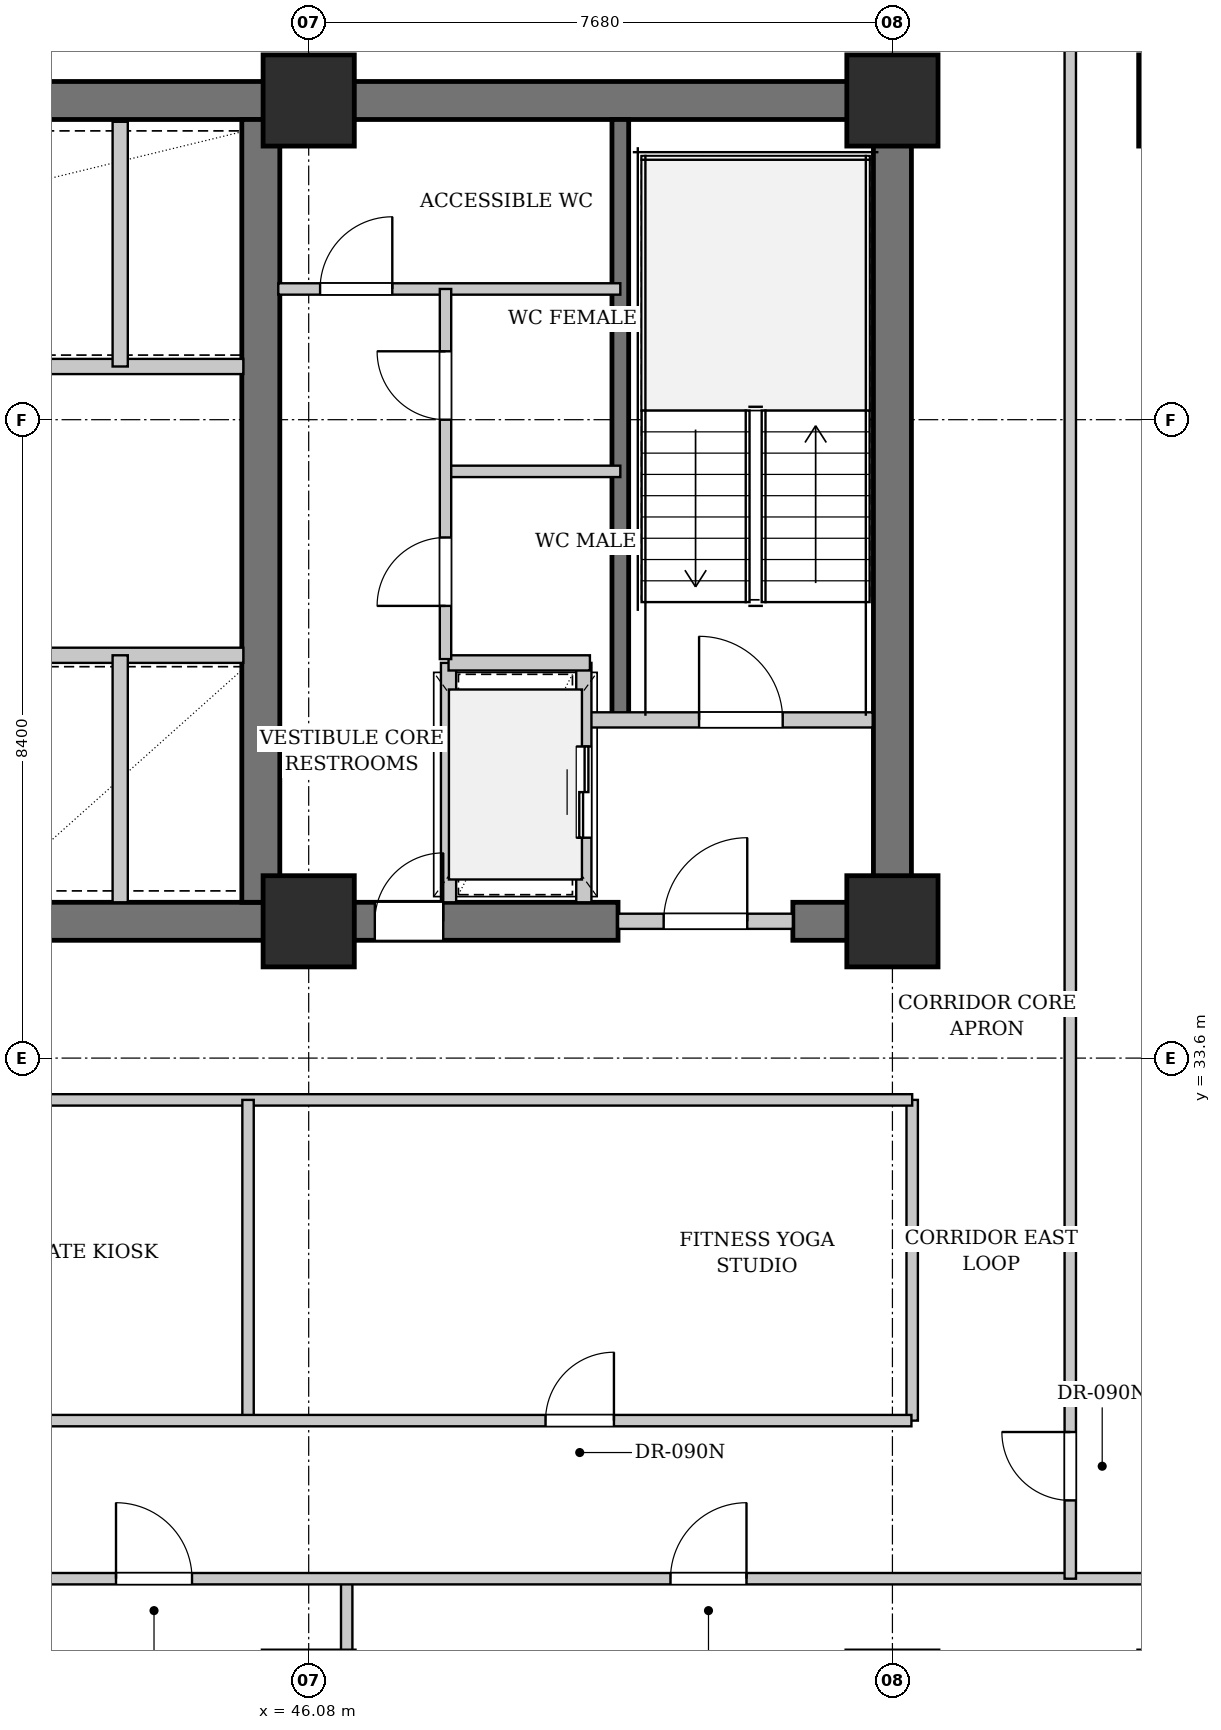
"""IFC4 building model, lengths in metres.
Left out: names, types, materials, properties, quantities, classifications, styles, units other than length and angle.
Written with IfcOpenShell. Run it as: python <this file> out.ifc"""

import sys

from ifc_helpers import new_model, si_unit, direction, frame, frame_2d, origin, origin_2d, place, context, subcontext, project, spatial, rectangle, extrude, element, fill, save


model = new_model("IFC4")
c1 = context("Model", 3, precision=1e-05, world=origin(), true_north=direction((0.0, 1.0)))
c2 = subcontext(c1, "Body", "Model", "MODEL_VIEW")
j1 = project(units=[si_unit("LENGTHUNIT", "METRE"), si_unit("PLANEANGLEUNIT", "RADIAN")], contexts=[c1])
p1 = place(None, origin())
s1 = spatial("IfcSite", under=j1, at=p1, CompositionType="ELEMENT")
p2 = place(p1, origin())
s2 = spatial("IfcBuilding", under=s1, at=p2, CompositionType="ELEMENT")
p3 = place(p2, frame((0.0, 0.0, 54.2)))
s3 = spatial("IfcBuildingStorey", under=s2, at=p3, CompositionType="ELEMENT", Elevation=54.2)
p4 = place(p3, frame((22.79, 46.2, 0.0), z_axis=(0.0, 0.0, 1.0), x_axis=(1.0, 0.0, 0.0)))
e1 = element("IfcWall", 1, at=p4, inside=s3, PredefinedType="SHEAR", context=c2, shape_type="SweptSolid", body=[
    extrude(rectangle(XDim=31.22, YDim=0.5, at=frame_2d((15.61, 0.0))), origin(), (0.0, 0.0, 1.0), 3.18),
])
p5 = place(p3, frame((42.1, 35.4, 0.0), z_axis=(0.0, 0.0, 1.0), x_axis=(1.0, 0.0, 0.0)))
e2 = element("IfcWall", 2, at=p5, inside=s3, PredefinedType="SHEAR", context=c2, shape_type="SweptSolid", body=[
    extrude(rectangle(XDim=8.05, YDim=0.5, at=frame_2d((4.025, 0.0))), origin(), (0.0, 0.0, 1.0), 3.18),
])
p6 = place(p5, frame((4.85, 0.0, 0.0)))
e3 = element("IfcOpeningElement", 3, at=p6, cuts=e2, PredefinedType="OPENING", context=c2, shape_type="SweptSolid", body=[
    extrude(rectangle(XDim=0.9, YDim=2.15, at=frame_2d((0.45, 1.075))), frame((0.0, 0.26, 0.0), z_axis=(0.0, -1.0, 0.0), x_axis=(1.0, 0.0, 0.0)), (0.0, 0.0, 1.0), 0.52),
])
p7 = place(p3, frame((52.45, 35.4, 0.0), z_axis=(0.0, 0.0, 1.0), x_axis=(1.0, 0.0, 0.0)))
e4 = element("IfcWall", 4, at=p7, inside=s3, PredefinedType="SHEAR", context=c2, shape_type="SweptSolid", body=[
    extrude(rectangle(XDim=1.56, YDim=0.5, at=frame_2d((0.78, 0.0))), origin(), (0.0, 0.0, 1.0), 3.18),
])
for number, where, z_axis, x_axis in (
    (5, (45.45, 35.65, 0.0), (0.0, 0.0, 1.0), (0.0, 1.0, 0.0)),
    (6, (53.76, 35.65, 0.0), (0.0, 0.0, 1.0), (0.0, 1.0, 0.0)),
):
    element("IfcWall", number, at=place(p3, frame(where, z_axis=z_axis, x_axis=x_axis)), inside=s3, PredefinedType="SHEAR", context=c2, shape_type="SweptSolid", body=[
        extrude(rectangle(XDim=10.3, YDim=0.5, at=frame_2d((5.15, 0.0))), origin(), (0.0, 0.0, 1.0), 3.18),
    ])
p8 = place(p3, frame((50.18, 38.05, 0.0), z_axis=(0.0, 0.0, 1.0), x_axis=(0.0, 1.0, 0.0)))
e7 = element("IfcWall", 7, at=p8, inside=s3, PredefinedType="SHEAR", context=c2, shape_type="SweptSolid", body=[
    extrude(rectangle(XDim=7.9, YDim=0.22, at=frame_2d((3.95, 0.0))), origin(), (0.0, 0.0, 1.0), 3.18),
])
for number, where, z_axis, x_axis in (
    (8, (46.08, 35.4, 0.0), (0.0, 0.0, 1.0), (1.0, 0.0, 0.0)),
    (9, (46.08, 46.2, 0.0), (0.0, 0.0, 1.0), (1.0, 0.0, 0.0)),
    (10, (53.76, 35.4, 0.0), (0.0, 0.0, 1.0), (1.0, 0.0, 0.0)),
    (11, (53.76, 46.2, 0.0), (0.0, 0.0, 1.0), (1.0, 0.0, 0.0)),
    (12, (57.6, 46.2, 0.0), (0.0, 0.0, 1.0), (1.0, 0.0, 0.0)),
):
    element("IfcColumn", number, at=place(p3, frame(where, z_axis=z_axis, x_axis=x_axis)), inside=s3, PredefinedType="COLUMN", context=c2, shape_type="SweptSolid", body=[
        extrude(rectangle(XDim=1.2, YDim=1.2, at=origin_2d()), origin(), (0.0, 0.0, 1.0), 3.4),
    ])
for number, where, z_axis, x_axis in (
    (13, (41.85, 38.9, 0.0), (0.0, 0.0, 1.0), (1.0, 0.0, 0.0)),
    (14, (41.85, 42.7, 0.0), (0.0, 0.0, 1.0), (1.0, 0.0, 0.0)),
):
    element("IfcWall", number, at=place(p3, frame(where, z_axis=z_axis, x_axis=x_axis)), inside=s3, PredefinedType="PARTITIONING", context=c2, shape_type="SweptSolid", body=[
        extrude(rectangle(XDim=3.37, YDim=0.2, at=frame_2d((1.685, 0.0))), origin(), (0.0, 0.0, 1.0), 3.18),
    ])
p9 = place(p3, frame((43.6, 35.65, 0.0), z_axis=(0.0, 0.0, 1.0), x_axis=(0.0, 1.0, 0.0)))
e15 = element("IfcWall", 15, at=p9, inside=s3, PredefinedType="PARTITIONING", context=c2, shape_type="SweptSolid", body=[
    extrude(rectangle(XDim=3.25, YDim=0.2, at=frame_2d((1.625, 0.0))), origin(), (0.0, 0.0, 1.0), 3.18),
])
p10 = place(p3, frame((43.6, 42.7, 0.0), z_axis=(0.0, 0.0, 1.0), x_axis=(0.0, 1.0, 0.0)))
e16 = element("IfcWall", 16, at=p10, inside=s3, PredefinedType="PARTITIONING", context=c2, shape_type="SweptSolid", body=[
    extrude(rectangle(XDim=3.22, YDim=0.2, at=frame_2d((1.61, 0.0))), origin(), (0.0, 0.0, 1.0), 3.18),
])
p11 = place(p3, frame((49.78, 38.05, 0.0), z_axis=(0.0, 0.0, 1.0), x_axis=(1.0, 0.0, 0.0)))
e17 = element("IfcWall", 17, at=p11, inside=s3, PredefinedType="PARTITIONING", context=c2, shape_type="SweptSolid", body=[
    extrude(rectangle(XDim=3.72, YDim=0.2, at=frame_2d((1.86, 0.0))), origin(), (0.0, 0.0, 1.0), 3.18),
])
p12 = place(p11, frame((1.436, 0.0, 0.0)))
e18 = element("IfcOpeningElement", 18, at=p12, cuts=e17, PredefinedType="OPENING", context=c2, shape_type="SweptSolid", body=[
    extrude(rectangle(XDim=1.1, YDim=2.15, at=frame_2d((0.55, 1.075))), frame((0.0, 0.11, 0.0), z_axis=(0.0, -1.0, 0.0), x_axis=(1.0, 0.0, 0.0)), (0.0, 0.0, 1.0), 0.22),
])
p13 = place(p3, frame((50.15, 35.4, 0.0), z_axis=(0.0, 0.0, 1.0), x_axis=(1.0, 0.0, 0.0)))
e19 = element("IfcWall", 19, at=p13, inside=s3, PredefinedType="PARTITIONING", context=c2, shape_type="SweptSolid", body=[
    extrude(rectangle(XDim=2.3, YDim=0.2, at=frame_2d((1.15, 0.0))), origin(), (0.0, 0.0, 1.0), 2.475),
])
p14 = place(p13, frame((0.6, 0.0, 0.0)))
e20 = element("IfcOpeningElement", 20, at=p14, cuts=e19, PredefinedType="OPENING", context=c2, shape_type="SweptSolid", body=[
    extrude(rectangle(XDim=1.1, YDim=2.15, at=frame_2d((0.55, 1.075))), frame((0.0, 0.11, 0.0), z_axis=(0.0, -1.0, 0.0), x_axis=(1.0, 0.0, 0.0)), (0.0, 0.0, 1.0), 0.22),
])
p15 = place(p3, frame((49.7, 35.65, 0.0), z_axis=(0.0, 0.0, 1.0), x_axis=(0.0, 1.0, 0.0)))
e21 = element("IfcWall", 21, at=p15, inside=s3, PredefinedType="PARTITIONING", context=c2, shape_type="SweptSolid", body=[
    extrude(rectangle(XDim=3.15, YDim=0.2, at=frame_2d((1.575, 0.0))), origin(), (0.0, 0.0, 1.0), 3.18),
])
p16 = place(p15, frame((0.85, 0.0, 0.0)))
e22 = element("IfcOpeningElement", 22, at=p16, cuts=e21, PredefinedType="OPENING", context=c2, shape_type="SweptSolid", body=[
    extrude(rectangle(XDim=1.2, YDim=2.2, at=frame_2d((0.6, 1.1))), frame((0.0, 0.11, 0.0), z_axis=(0.0, -1.0, 0.0), x_axis=(1.0, 0.0, 0.0)), (0.0, 0.0, 1.0), 0.22),
])
p17 = place(p3, frame((47.92, 35.65, 0.0), z_axis=(0.0, 0.0, 1.0), x_axis=(0.0, 1.0, 0.0)))
e23 = element("IfcWall", 23, at=p17, inside=s3, PredefinedType="PARTITIONING", context=c2, shape_type="SweptSolid", body=[
    extrude(rectangle(XDim=3.15, YDim=0.2, at=frame_2d((1.575, 0.0))), origin(), (0.0, 0.0, 1.0), 3.18),
])
p18 = place(p3, frame((47.92, 38.8, 0.0), z_axis=(0.0, 0.0, 1.0), x_axis=(1.0, 0.0, 0.0)))
e24 = element("IfcWall", 24, at=p18, inside=s3, PredefinedType="PARTITIONING", context=c2, shape_type="SweptSolid", body=[
    extrude(rectangle(XDim=1.86, YDim=0.2, at=frame_2d((0.93, 0.0))), origin(), (0.0, 0.0, 1.0), 3.18),
])
p19 = place(p3, frame((45.68, 43.72, 0.0), z_axis=(0.0, 0.0, 1.0), x_axis=(1.0, 0.0, 0.0)))
e25 = element("IfcWall", 25, at=p19, inside=s3, PredefinedType="PARTITIONING", context=c2, shape_type="SweptSolid", body=[
    extrude(rectangle(XDim=4.5, YDim=0.15, at=frame_2d((2.25, 0.0))), origin(), (0.0, 0.0, 1.0), 3.18),
])
p20 = place(p19, frame((0.55, 0.0, 0.0)))
e26 = element("IfcOpeningElement", 26, at=p20, cuts=e25, PredefinedType="OPENING", context=c2, shape_type="SweptSolid", body=[
    extrude(rectangle(XDim=0.95, YDim=2.15, at=frame_2d((0.475, 1.075))), frame((0.0, 0.085, 0.0), z_axis=(0.0, -1.0, 0.0), x_axis=(1.0, 0.0, 0.0)), (0.0, 0.0, 1.0), 0.17),
])
p21 = place(p3, frame((47.88, 41.32, 0.0), z_axis=(0.0, 0.0, 1.0), x_axis=(1.0, 0.0, 0.0)))
e27 = element("IfcWall", 27, at=p21, inside=s3, PredefinedType="PARTITIONING", context=c2, shape_type="SweptSolid", body=[
    extrude(rectangle(XDim=2.3, YDim=0.15, at=frame_2d((1.15, 0.0))), origin(), (0.0, 0.0, 1.0), 3.18),
])
p22 = place(p3, frame((47.88, 38.85, 0.0), z_axis=(0.0, 0.0, 1.0), x_axis=(0.0, 1.0, 0.0)))
e28 = element("IfcWall", 28, at=p22, inside=s3, PredefinedType="PARTITIONING", context=c2, shape_type="SweptSolid", body=[
    extrude(rectangle(XDim=4.87, YDim=0.15, at=frame_2d((2.435, 0.0))), origin(), (0.0, 0.0, 1.0), 3.18),
])
p23 = place(p22, frame((0.7, 0.0, 0.0)))
e29 = element("IfcOpeningElement", 29, at=p23, cuts=e28, PredefinedType="OPENING", context=c2, shape_type="SweptSolid", body=[
    extrude(rectangle(XDim=0.9, YDim=2.15, at=frame_2d((0.45, 1.075))), frame((0.0, 0.085, 0.0), z_axis=(0.0, -1.0, 0.0), x_axis=(1.0, 0.0, 0.0)), (0.0, 0.0, 1.0), 0.17),
])
p24 = place(p22, frame((3.15, 0.0, 0.0)))
e30 = element("IfcOpeningElement", 30, at=p24, cuts=e28, PredefinedType="OPENING", context=c2, shape_type="SweptSolid", body=[
    extrude(rectangle(XDim=0.9, YDim=2.15, at=frame_2d((0.45, 1.075))), frame((0.0, 0.085, 0.0), z_axis=(0.0, -1.0, 0.0), x_axis=(1.0, 0.0, 0.0)), (0.0, 0.0, 1.0), 0.17),
])
p25 = place(p3, frame((46.58, 10.28, 0.0), z_axis=(0.0, 0.0, 1.0), x_axis=(0.0, 1.0, 0.0)))
e31 = element("IfcWall", 31, at=p25, inside=s3, PredefinedType="PARTITIONING", context=c2, shape_type="SweptSolid", body=[
    extrude(rectangle(XDim=16.49, YDim=0.15, at=frame_2d((8.245, 0.0))), origin(), (0.0, 0.0, 1.0), 3.18),
])
p26 = place(p3, frame((6.08, 26.75, 0.0), z_axis=(0.0, 0.0, 1.0), x_axis=(1.0, 0.0, 0.0)))
e32 = element("IfcWall", 32, at=p26, inside=s3, PredefinedType="PARTITIONING", context=c2, shape_type="SweptSolid", body=[
    extrude(rectangle(XDim=64.64, YDim=0.15, at=frame_2d((32.32, 0.0))), origin(), (0.0, 0.0, 1.0), 3.18),
])
p27 = place(p26, frame((18.479, 0.0, 0.0)))
e33 = element("IfcOpeningElement", 33, at=p27, cuts=e32, PredefinedType="OPENING", context=c2, shape_type="SweptSolid", body=[
    extrude(rectangle(XDim=1.0, YDim=2.15, at=frame_2d((0.5, 1.075))), frame((0.0, 0.085, 0.0), z_axis=(0.0, -1.0, 0.0), x_axis=(1.0, 0.0, 0.0)), (0.0, 0.0, 1.0), 0.17),
])
p28 = place(p26, frame((22.394, 0.0, 0.0)))
e34 = element("IfcOpeningElement", 34, at=p28, cuts=e32, PredefinedType="OPENING", context=c2, shape_type="SweptSolid", body=[
    extrude(rectangle(XDim=1.0, YDim=2.15, at=frame_2d((0.5, 1.075))), frame((0.0, 0.085, 0.0), z_axis=(0.0, -1.0, 0.0), x_axis=(1.0, 0.0, 0.0)), (0.0, 0.0, 1.0), 0.17),
])
p29 = place(p26, frame((28.206, 0.0, 0.0)))
e35 = element("IfcOpeningElement", 35, at=p29, cuts=e32, PredefinedType="OPENING", context=c2, shape_type="SweptSolid", body=[
    extrude(rectangle(XDim=1.0, YDim=2.15, at=frame_2d((0.5, 1.075))), frame((0.0, 0.085, 0.0), z_axis=(0.0, -1.0, 0.0), x_axis=(1.0, 0.0, 0.0)), (0.0, 0.0, 1.0), 0.17),
])
p30 = place(p26, frame((33.892, 0.0, 0.0)))
e36 = element("IfcOpeningElement", 36, at=p30, cuts=e32, PredefinedType="OPENING", context=c2, shape_type="SweptSolid", body=[
    extrude(rectangle(XDim=1.0, YDim=2.15, at=frame_2d((0.5, 1.075))), frame((0.0, 0.085, 0.0), z_axis=(0.0, -1.0, 0.0), x_axis=(1.0, 0.0, 0.0)), (0.0, 0.0, 1.0), 0.17),
])
p31 = place(p26, frame((37.465, 0.0, 0.0)))
e37 = element("IfcOpeningElement", 37, at=p31, cuts=e32, PredefinedType="OPENING", context=c2, shape_type="SweptSolid", body=[
    extrude(rectangle(XDim=1.0, YDim=2.15, at=frame_2d((0.5, 1.075))), frame((0.0, 0.085, 0.0), z_axis=(0.0, -1.0, 0.0), x_axis=(1.0, 0.0, 0.0)), (0.0, 0.0, 1.0), 0.17),
])
p32 = place(p26, frame((44.76, 0.0, 0.0)))
e38 = element("IfcOpeningElement", 38, at=p32, cuts=e32, PredefinedType="OPENING", context=c2, shape_type="SweptSolid", body=[
    extrude(rectangle(XDim=1.0, YDim=2.15, at=frame_2d((0.5, 1.075))), frame((0.0, 0.085, 0.0), z_axis=(0.0, -1.0, 0.0), x_axis=(1.0, 0.0, 0.0)), (0.0, 0.0, 1.0), 0.17),
])
p33 = place(p3, frame((56.1, 26.75, 0.0), z_axis=(0.0, 0.0, 1.0), x_axis=(0.0, 1.0, 0.0)))
e39 = element("IfcWall", 39, at=p33, inside=s3, PredefinedType="PARTITIONING", context=c2, shape_type="SweptSolid", body=[
    extrude(rectangle(XDim=21.77, YDim=0.15, at=frame_2d((10.885, 0.0))), origin(), (0.0, 0.0, 1.0), 3.18),
])
p34 = place(p33, frame((1.03, 0.0, 0.0)))
e40 = element("IfcOpeningElement", 40, at=p34, cuts=e39, PredefinedType="OPENING", context=c2, shape_type="SweptSolid", body=[
    extrude(rectangle(XDim=0.9, YDim=2.15, at=frame_2d((0.45, 1.075))), frame((0.0, 0.085, 0.0), z_axis=(0.0, -1.0, 0.0), x_axis=(1.0, 0.0, 0.0)), (0.0, 0.0, 1.0), 0.17),
])
p35 = place(p3, frame((54.02, 28.83, 0.0), z_axis=(0.0, 0.0, 1.0), x_axis=(0.0, 1.0, 0.0)))
e41 = element("IfcWall", 41, at=p35, inside=s3, PredefinedType="PARTITIONING", context=c2, shape_type="SweptSolid", body=[
    extrude(rectangle(XDim=4.22, YDim=0.15, at=frame_2d((2.11, 0.0))), origin(), (0.0, 0.0, 1.0), 3.18),
])
p36 = place(p3, frame((22.83, 33.05, 0.0), z_axis=(0.0, 0.0, 1.0), x_axis=(1.0, 0.0, 0.0)))
e42 = element("IfcWall", 42, at=p36, inside=s3, PredefinedType="PARTITIONING", context=c2, shape_type="SweptSolid", body=[
    extrude(rectangle(XDim=31.19, YDim=0.15, at=frame_2d((15.595, 0.0))), origin(), (0.0, 0.0, 1.0), 3.18),
])
p37 = place(p3, frame((45.282, 28.83, 0.0), z_axis=(0.0, 0.0, 1.0), x_axis=(0.0, 1.0, 0.0)))
e43 = element("IfcWall", 43, at=p37, inside=s3, PredefinedType="PARTITIONING", context=c2, shape_type="SweptSolid", body=[
    extrude(rectangle(XDim=4.22, YDim=0.15, at=frame_2d((2.11, 0.0))), origin(), (0.0, 0.0, 1.0), 3.18),
])
p38 = place(p3, frame((22.84, 28.83, 0.0), z_axis=(0.0, 0.0, 1.0), x_axis=(1.0, 0.0, 0.0)))
e44 = element("IfcWall", 44, at=p38, inside=s3, PredefinedType="PARTITIONING", context=c2, shape_type="SweptSolid", body=[
    extrude(rectangle(XDim=31.17, YDim=0.15, at=frame_2d((15.585, 0.0))), origin(), (0.0, 0.0, 1.0), 3.18),
])
p39 = place(p38, frame((2.199, 0.0, 0.0)))
e45 = element("IfcOpeningElement", 45, at=p39, cuts=e44, PredefinedType="OPENING", context=c2, shape_type="SweptSolid", body=[
    extrude(rectangle(XDim=0.9, YDim=2.15, at=frame_2d((0.45, 1.075))), frame((0.0, 0.085, 0.0), z_axis=(0.0, -1.0, 0.0), x_axis=(1.0, 0.0, 0.0)), (0.0, 0.0, 1.0), 0.17),
])
p40 = place(p38, frame((8.59, 0.0, 0.0)))
e46 = element("IfcOpeningElement", 46, at=p40, cuts=e44, PredefinedType="OPENING", context=c2, shape_type="SweptSolid", body=[
    extrude(rectangle(XDim=0.9, YDim=2.15, at=frame_2d((0.45, 1.075))), frame((0.0, 0.085, 0.0), z_axis=(0.0, -1.0, 0.0), x_axis=(1.0, 0.0, 0.0)), (0.0, 0.0, 1.0), 0.17),
])
p41 = place(p38, frame((17.161, 0.0, 0.0)))
e47 = element("IfcOpeningElement", 47, at=p41, cuts=e44, PredefinedType="OPENING", context=c2, shape_type="SweptSolid", body=[
    extrude(rectangle(XDim=0.9, YDim=2.15, at=frame_2d((0.45, 1.075))), frame((0.0, 0.085, 0.0), z_axis=(0.0, -1.0, 0.0), x_axis=(1.0, 0.0, 0.0)), (0.0, 0.0, 1.0), 0.17),
])
p42 = place(p38, frame((26.356, 0.0, 0.0)))
e48 = element("IfcOpeningElement", 48, at=p42, cuts=e44, PredefinedType="OPENING", context=c2, shape_type="SweptSolid", body=[
    extrude(rectangle(XDim=0.9, YDim=2.15, at=frame_2d((0.45, 1.075))), frame((0.0, 0.085, 0.0), z_axis=(0.0, -1.0, 0.0), x_axis=(1.0, 0.0, 0.0)), (0.0, 0.0, 1.0), 0.17),
])
p43 = place(p12, origin())
e49 = element("IfcDoor", 49, at=p43, inside=s3, OperationType="SINGLE_SWING_LEFT", PredefinedType="DOOR", context=c2, shape_type="SweptSolid", body=[
    extrude(rectangle(XDim=1.1, YDim=2.15, at=frame_2d((0.55, 1.075))), frame((0.0, 0.025, 0.0), z_axis=(0.0, -1.0, 0.0), x_axis=(1.0, 0.0, 0.0)), (0.0, 0.0, 1.0), 0.05),
])
fill(e18, e49)
p44 = place(p14, origin())
e50 = element("IfcDoor", 50, at=p44, inside=s3, OperationType="SINGLE_SWING_RIGHT", PredefinedType="DOOR", context=c2, shape_type="SweptSolid", body=[
    extrude(rectangle(XDim=1.1, YDim=2.15, at=frame_2d((0.55, 1.075))), frame((0.0, 0.025, 0.0), z_axis=(0.0, -1.0, 0.0), x_axis=(1.0, 0.0, 0.0)), (0.0, 0.0, 1.0), 0.05),
])
fill(e20, e50)
p45 = place(p16, origin())
e51 = element("IfcDoor", 51, at=p45, inside=s3, OperationType="DOUBLE_DOOR_SLIDING", PredefinedType="DOOR", context=c2, shape_type="SweptSolid", body=[
    extrude(rectangle(XDim=1.2, YDim=2.2, at=frame_2d((0.6, 1.1))), frame((0.0, 0.025, 0.0), z_axis=(0.0, -1.0, 0.0), x_axis=(1.0, 0.0, 0.0)), (0.0, 0.0, 1.0), 0.05),
])
fill(e22, e51)
p46 = place(p20, origin())
e52 = element("IfcDoor", 52, at=p46, inside=s3, OperationType="SINGLE_SWING_RIGHT", PredefinedType="DOOR", context=c2, shape_type="SweptSolid", body=[
    extrude(rectangle(XDim=0.95, YDim=2.15, at=frame_2d((0.475, 1.075))), frame((0.0, 0.025, 0.0), z_axis=(0.0, -1.0, 0.0), x_axis=(1.0, 0.0, 0.0)), (0.0, 0.0, 1.0), 0.05),
])
fill(e26, e52)
p47 = place(p23, origin())
e53 = element("IfcDoor", 53, at=p47, inside=s3, OperationType="SINGLE_SWING_LEFT", PredefinedType="DOOR", context=c2, shape_type="SweptSolid", body=[
    extrude(rectangle(XDim=0.9, YDim=2.15, at=frame_2d((0.45, 1.075))), frame((0.0, 0.025, 0.0), z_axis=(0.0, -1.0, 0.0), x_axis=(1.0, 0.0, 0.0)), (0.0, 0.0, 1.0), 0.05),
])
fill(e29, e53)
p48 = place(p24, origin())
e54 = element("IfcDoor", 54, at=p48, inside=s3, OperationType="SINGLE_SWING_RIGHT", PredefinedType="DOOR", context=c2, shape_type="SweptSolid", body=[
    extrude(rectangle(XDim=0.9, YDim=2.15, at=frame_2d((0.45, 1.075))), frame((0.0, 0.025, 0.0), z_axis=(0.0, -1.0, 0.0), x_axis=(1.0, 0.0, 0.0)), (0.0, 0.0, 1.0), 0.05),
])
fill(e30, e54)
p49 = place(p31, origin())
e55 = element("IfcDoor", 55, at=p49, inside=s3, OperationType="SINGLE_SWING_LEFT", PredefinedType="DOOR", context=c2, shape_type="SweptSolid", body=[
    extrude(rectangle(XDim=1.0, YDim=2.15, at=frame_2d((0.5, 1.075))), frame((0.0, 0.025, 0.0), z_axis=(0.0, -1.0, 0.0), x_axis=(1.0, 0.0, 0.0)), (0.0, 0.0, 1.0), 0.05),
])
fill(e37, e55)
p50 = place(p32, origin())
e56 = element("IfcDoor", 56, at=p50, inside=s3, OperationType="SINGLE_SWING_RIGHT", PredefinedType="DOOR", context=c2, shape_type="SweptSolid", body=[
    extrude(rectangle(XDim=1.0, YDim=2.15, at=frame_2d((0.5, 1.075))), frame((0.0, 0.025, 0.0), z_axis=(0.0, -1.0, 0.0), x_axis=(1.0, 0.0, 0.0)), (0.0, 0.0, 1.0), 0.05),
])
fill(e38, e56)
p51 = place(p34, origin())
e57 = element("IfcDoor", 57, at=p51, inside=s3, OperationType="SINGLE_SWING_RIGHT", PredefinedType="DOOR", context=c2, shape_type="SweptSolid", body=[
    extrude(rectangle(XDim=0.9, YDim=2.15, at=frame_2d((0.45, 1.075))), frame((0.0, 0.025, 0.0), z_axis=(0.0, -1.0, 0.0), x_axis=(1.0, 0.0, 0.0)), (0.0, 0.0, 1.0), 0.05),
])
fill(e40, e57)
p52 = place(p42, origin())
e58 = element("IfcDoor", 58, at=p52, inside=s3, OperationType="SINGLE_SWING_RIGHT", PredefinedType="DOOR", context=c2, shape_type="SweptSolid", body=[
    extrude(rectangle(XDim=0.9, YDim=2.15, at=frame_2d((0.45, 1.075))), frame((0.0, 0.025, 0.0), z_axis=(0.0, -1.0, 0.0), x_axis=(1.0, 0.0, 0.0)), (0.0, 0.0, 1.0), 0.05),
])
fill(e48, e58)
p53 = place(p6, origin())
e59 = element("IfcDoor", 59, at=p53, inside=s3, OperationType="SINGLE_SWING_RIGHT", PredefinedType="DOOR", context=c2, shape_type="SweptSolid", body=[
    extrude(rectangle(XDim=0.9, YDim=2.15, at=frame_2d((0.45, 1.075))), frame((0.0, 0.025, 0.0), z_axis=(0.0, -1.0, 0.0), x_axis=(1.0, 0.0, 0.0)), (0.0, 0.0, 1.0), 0.05),
])
fill(e3, e59)
save(model, sys.argv[1])
